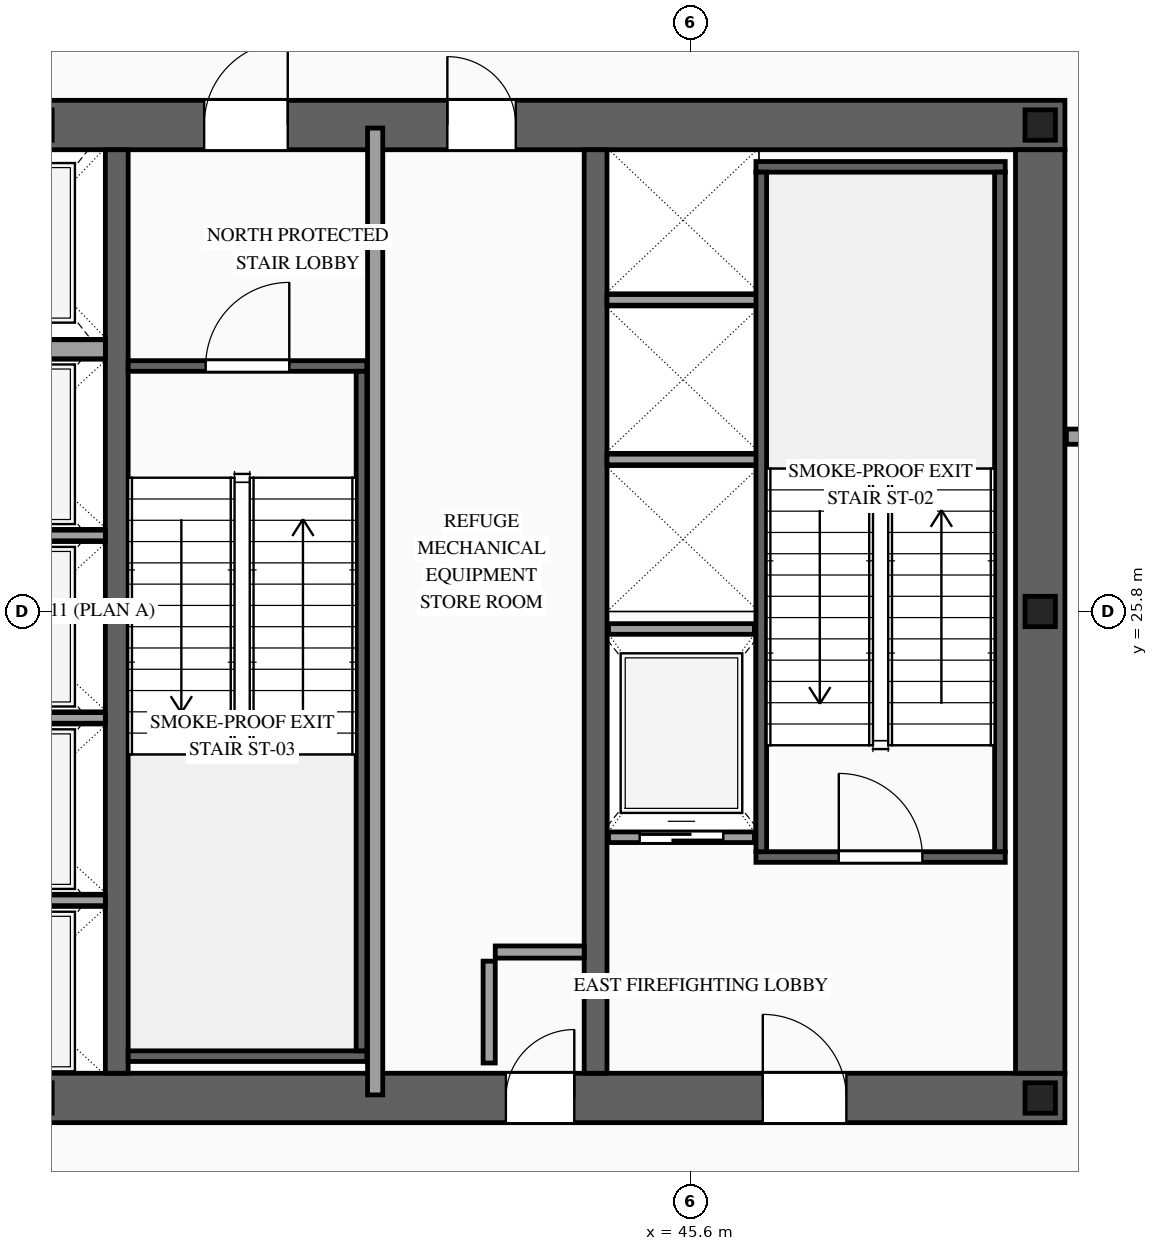
"""IFC4 building model, lengths in metres.
Left out: names, types, materials, properties, quantities, classifications, styles, units other than length and angle.
Written with IfcOpenShell. Run it as: python <this file> out.ifc"""

import sys

from ifc_helpers import new_model, si_unit, direction, frame, frame_2d, origin, origin_2d, place, context, subcontext, project, spatial, rectangle, i_section, extrude, source, transform, mapped, element, fill, save


model = new_model("IFC4")
c1 = context("Model", 3, precision=1e-05, world=origin(), true_north=direction((0.0, 1.0)))
c2 = subcontext(c1, "Body", "Model", "MODEL_VIEW")
j1 = project(units=[si_unit("LENGTHUNIT", "METRE"), si_unit("PLANEANGLEUNIT", "RADIAN")], contexts=[c1])
p1 = place(None, origin())
s1 = spatial("IfcSite", under=j1, at=p1, CompositionType="ELEMENT")
p2 = place(p1, origin())
s2 = spatial("IfcBuilding", under=s1, at=p2, CompositionType="ELEMENT")
p3 = place(p2, frame((0.0, 0.0, 176.4)))
s3 = spatial("IfcBuildingStorey", under=s2, at=p3, CompositionType="ELEMENT", Elevation=176.4)
p4 = place(p3, frame((23.475, 19.4, 0.0), z_axis=(0.0, 0.0, 1.0), x_axis=(1.0, 0.0, 0.0)))
e1 = element("IfcWall", 1, at=p4, inside=s3, PredefinedType="SHEAR", context=c2, shape_type="SweptSolid", body=[
    extrude(rectangle(XDim=27.05, YDim=0.65, at=frame_2d((13.525, 0.0))), origin(), (0.0, 0.0, 1.0), 4.6),
])
p5 = place(p4, frame((1.975, 0.0, 0.0)))
e2 = element("IfcOpeningElement", 2, at=p5, cuts=e1, PredefinedType="OPENING", context=c2, shape_type="SweptSolid", body=[
    extrude(rectangle(XDim=1.1, YDim=2.2, at=frame_2d((0.55, 1.1))), frame((0.0, 0.34, 0.0), z_axis=(0.0, -1.0, 0.0), x_axis=(1.0, 0.0, 0.0)), (0.0, 0.0, 1.0), 0.68),
])
p6 = place(p4, frame((9.875, 0.0, 0.0)))
e3 = element("IfcOpeningElement", 3, at=p6, cuts=e1, PredefinedType="OPENING", context=c2, shape_type="SweptSolid", body=[
    extrude(rectangle(XDim=1.1, YDim=2.2, at=frame_2d((0.55, 1.1))), frame((0.0, 0.34, 0.0), z_axis=(0.0, -1.0, 0.0), x_axis=(1.0, 0.0, 0.0)), (0.0, 0.0, 1.0), 0.68),
])
p7 = place(p4, frame((23.075, 0.0, 0.0)))
e4 = element("IfcOpeningElement", 4, at=p7, cuts=e1, PredefinedType="OPENING", context=c2, shape_type="SweptSolid", body=[
    extrude(rectangle(XDim=1.1, YDim=2.2, at=frame_2d((0.55, 1.1))), frame((0.0, 0.34, 0.0), z_axis=(0.0, -1.0, 0.0), x_axis=(1.0, 0.0, 0.0)), (0.0, 0.0, 1.0), 0.68),
])
p8 = place(p4, frame((19.695, 0.0, 0.0)))
e5 = element("IfcOpeningElement", 5, at=p8, cuts=e1, PredefinedType="OPENING", context=c2, shape_type="SweptSolid", body=[
    extrude(rectangle(XDim=0.9, YDim=2.15, at=frame_2d((0.45, 1.075))), frame((0.0, 0.34, 0.0), z_axis=(0.0, -1.0, 0.0), x_axis=(1.0, 0.0, 0.0)), (0.0, 0.0, 1.0), 0.68),
])
p9 = place(p3, frame((23.475, 32.2, 0.0), z_axis=(0.0, 0.0, 1.0), x_axis=(1.0, 0.0, 0.0)))
e6 = element("IfcWall", 6, at=p9, inside=s3, PredefinedType="SHEAR", context=c2, shape_type="SweptSolid", body=[
    extrude(rectangle(XDim=27.05, YDim=0.65, at=frame_2d((13.525, 0.0))), origin(), (0.0, 0.0, 1.0), 4.6),
])
p10 = place(p9, frame((4.595, 0.0, 0.0)))
e7 = element("IfcOpeningElement", 7, at=p10, cuts=e6, PredefinedType="OPENING", context=c2, shape_type="SweptSolid", body=[
    extrude(rectangle(XDim=0.9, YDim=2.15, at=frame_2d((0.45, 1.075))), frame((0.0, 0.34, 0.0), z_axis=(0.0, -1.0, 0.0), x_axis=(1.0, 0.0, 0.0)), (0.0, 0.0, 1.0), 0.68),
])
p11 = place(p9, frame((9.875, 0.0, 0.0)))
e8 = element("IfcOpeningElement", 8, at=p11, cuts=e6, PredefinedType="OPENING", context=c2, shape_type="SweptSolid", body=[
    extrude(rectangle(XDim=1.1, YDim=2.2, at=frame_2d((0.55, 1.1))), frame((0.0, 0.34, 0.0), z_axis=(0.0, -1.0, 0.0), x_axis=(1.0, 0.0, 0.0)), (0.0, 0.0, 1.0), 0.68),
])
p12 = place(p9, frame((15.725, 0.0, 0.0)))
e9 = element("IfcOpeningElement", 9, at=p12, cuts=e6, PredefinedType="OPENING", context=c2, shape_type="SweptSolid", body=[
    extrude(rectangle(XDim=1.1, YDim=2.2, at=frame_2d((0.55, 1.1))), frame((0.0, 0.34, 0.0), z_axis=(0.0, -1.0, 0.0), x_axis=(1.0, 0.0, 0.0)), (0.0, 0.0, 1.0), 0.68),
])
p13 = place(p9, frame((18.925, 0.0, 0.0)))
e10 = element("IfcOpeningElement", 10, at=p13, cuts=e6, PredefinedType="OPENING", context=c2, shape_type="SweptSolid", body=[
    extrude(rectangle(XDim=0.9, YDim=2.15, at=frame_2d((0.45, 1.075))), frame((0.0, 0.34, 0.0), z_axis=(0.0, -1.0, 0.0), x_axis=(1.0, 0.0, 0.0)), (0.0, 0.0, 1.0), 0.68),
])
m1 = source(origin(), c2, "Body", "SweptSolid", [
    extrude(rectangle(XDim=12.15, YDim=0.65, at=frame_2d((6.075, 0.0))), origin(), (0.0, 0.0, 1.0), 4.6),
])
p14 = place(p3, frame((50.2, 19.725, 0.0), z_axis=(0.0, 0.0, 1.0), x_axis=(0.0, 1.0, 0.0)))
e11 = element("IfcWall", 11, at=p14, inside=s3, PredefinedType="SHEAR", context=c2, shape_type="MappedRepresentation", body=[
    mapped(m1, transform((0.0, 0.0, 0.0), scale=1.0)),
])
m2 = source(origin(), c2, "Body", "SweptSolid", [
    extrude(rectangle(XDim=12.15, YDim=0.3, at=frame_2d((6.075, 0.0))), origin(), (0.0, 0.0, 1.0), 4.6),
])
for number, where, z_axis, x_axis in (
    (12, (38.05, 19.725, 0.0), (0.0, 0.0, 1.0), (0.0, 1.0, 0.0)),
    (13, (44.35, 19.725, 0.0), (0.0, 0.0, 1.0), (0.0, 1.0, 0.0)),
):
    element("IfcWall", number, at=place(p3, frame(where, z_axis=z_axis, x_axis=x_axis)), inside=s3, PredefinedType="SOLIDWALL", context=c2, shape_type="MappedRepresentation", body=[
        mapped(m2, transform((0.0, 0.0, 0.0), scale=1.0)),
    ])
m3 = source(origin(), c2, "Body", "SweptSolid", [
    extrude(i_section(OverallWidth=0.4, OverallDepth=0.4, WebThickness=0.013, FlangeThickness=0.021, at=origin_2d()), origin(), (0.0, 0.0, 1.0), 4.6),
])
for number, where, z_axis, x_axis in (
    (14, (50.2, 19.4, 0.0), (0.0, 0.0, 1.0), (1.0, 0.0, 0.0)),
    (15, (50.2, 25.8, 0.0), (0.0, 0.0, 1.0), (1.0, 0.0, 0.0)),
    (16, (50.2, 32.2, 0.0), (0.0, 0.0, 1.0), (1.0, 0.0, 0.0)),
):
    element("IfcColumn", number, at=place(p3, frame(where, z_axis=z_axis, x_axis=x_axis)), inside=s3, PredefinedType="COLUMN", context=c2, shape_type="MappedRepresentation", body=[
        mapped(m3, transform((0.0, 0.0, 0.0), scale=1.0)),
    ])
p15 = place(p3, frame((44.52, 22.83, 0.0), z_axis=(0.0, 0.0, 1.0), x_axis=(1.0, 0.0, 0.0)))
e17 = element("IfcWall", 17, at=p15, inside=s3, PredefinedType="SOLIDWALL", context=c2, shape_type="SweptSolid", body=[
    extrude(rectangle(XDim=1.92, YDim=0.14, at=frame_2d((0.96, 0.0))), origin(), (0.0, 0.0, 1.0), 4.38),
])
p16 = place(p15, frame((0.41, 0.0, 0.0)))
e18 = element("IfcOpeningElement", 18, at=p16, cuts=e17, PredefinedType="OPENING", context=c2, shape_type="SweptSolid", body=[
    extrude(rectangle(XDim=1.1, YDim=2.2, at=frame_2d((0.55, 1.1))), frame((0.0, 0.085, 0.0), z_axis=(0.0, -1.0, 0.0), x_axis=(1.0, 0.0, 0.0)), (0.0, 0.0, 1.0), 0.17),
])
m4 = source(origin(), c2, "Body", "SweptSolid", [
    extrude(rectangle(XDim=1.92, YDim=0.14, at=frame_2d((0.96, 0.0))), origin(), (0.0, 0.0, 1.0), 4.38),
])
p17 = place(p3, frame((44.52, 25.57, 0.0), z_axis=(0.0, 0.0, 1.0), x_axis=(1.0, 0.0, 0.0)))
e19 = element("IfcWall", 19, at=p17, inside=s3, PredefinedType="SOLIDWALL", context=c2, shape_type="MappedRepresentation", body=[
    mapped(m4, transform((0.0, 0.0, 0.0), scale=1.0)),
])
m5 = source(origin(), c2, "Body", "SweptSolid", [
    extrude(rectangle(XDim=2.4, YDim=0.14, at=frame_2d((1.2, 0.0))), origin(), (0.0, 0.0, 1.0), 4.38),
])
for number, where, z_axis, x_axis in (
    (20, (35.5, 22.0, 0.0), (0.0, 0.0, 1.0), (1.0, 0.0, 0.0)),
    (21, (35.5, 24.4, 0.0), (0.0, 0.0, 1.0), (1.0, 0.0, 0.0)),
    (22, (35.5, 26.8, 0.0), (0.0, 0.0, 1.0), (1.0, 0.0, 0.0)),
):
    element("IfcWall", number, at=place(p3, frame(where, z_axis=z_axis, x_axis=x_axis)), inside=s3, PredefinedType="SOLIDWALL", context=c2, shape_type="MappedRepresentation", body=[
        mapped(m5, transform((0.0, 0.0, 0.0), scale=1.0)),
    ])
m6 = source(origin(), c2, "Body", "SweptSolid", [
    extrude(rectangle(XDim=2.4, YDim=0.25, at=frame_2d((1.2, 0.0))), origin(), (0.0, 0.0, 1.0), 4.38),
])
p18 = place(p3, frame((35.5, 29.25, 0.0), z_axis=(0.0, 0.0, 1.0), x_axis=(1.0, 0.0, 0.0)))
e23 = element("IfcWall", 23, at=p18, inside=s3, PredefinedType="SOLIDWALL", context=c2, shape_type="MappedRepresentation", body=[
    mapped(m6, transform((0.0, 0.0, 0.0), scale=1.0)),
])
m7 = source(origin(), c2, "Body", "SweptSolid", [
    extrude(rectangle(XDim=2.0, YDim=0.14, at=frame_2d((1.0, 0.0))), origin(), (0.0, 0.0, 1.0), 4.38),
])
for number, where, z_axis, x_axis in (
    (24, (44.5, 27.8, 0.0), (0.0, 0.0, 1.0), (1.0, 0.0, 0.0)),
    (25, (44.5, 29.9, 0.0), (0.0, 0.0, 1.0), (1.0, 0.0, 0.0)),
):
    element("IfcWall", number, at=place(p3, frame(where, z_axis=z_axis, x_axis=x_axis)), inside=s3, PredefinedType="SOLIDWALL", context=c2, shape_type="MappedRepresentation", body=[
        mapped(m7, transform((0.0, 0.0, 0.0), scale=1.0)),
    ])
p19 = place(p3, frame((46.46, 22.57, 0.0), z_axis=(0.0, 0.0, 1.0), x_axis=(1.0, 0.0, 0.0)))
e26 = element("IfcWall", 26, at=p19, inside=s3, PredefinedType="SOLIDWALL", context=c2, shape_type="SweptSolid", body=[
    extrude(rectangle(XDim=3.28, YDim=0.14, at=frame_2d((1.64, 0.0))), origin(), (0.0, 0.0, 1.0), 4.38),
])
p20 = place(p19, frame((1.09, 0.0, 0.0)))
e27 = element("IfcOpeningElement", 27, at=p20, cuts=e26, PredefinedType="OPENING", context=c2, shape_type="SweptSolid", body=[
    extrude(rectangle(XDim=1.1, YDim=2.2, at=frame_2d((0.55, 1.1))), frame((0.0, 0.085, 0.0), z_axis=(0.0, -1.0, 0.0), x_axis=(1.0, 0.0, 0.0)), (0.0, 0.0, 1.0), 0.17),
])
m8 = source(origin(), c2, "Body", "SweptSolid", [
    extrude(rectangle(XDim=3.28, YDim=0.14, at=frame_2d((1.64, 0.0))), origin(), (0.0, 0.0, 1.0), 4.38),
])
p21 = place(p3, frame((46.46, 31.65, 0.0), z_axis=(0.0, 0.0, 1.0), x_axis=(1.0, 0.0, 0.0)))
e28 = element("IfcWall", 28, at=p21, inside=s3, PredefinedType="SOLIDWALL", context=c2, shape_type="MappedRepresentation", body=[
    mapped(m8, transform((0.0, 0.0, 0.0), scale=1.0)),
])
m9 = source(origin(), c2, "Body", "SweptSolid", [
    extrude(rectangle(XDim=8.94, YDim=0.14, at=frame_2d((4.47, 0.0))), origin(), (0.0, 0.0, 1.0), 4.38),
])
for number, where, z_axis, x_axis in (
    (29, (46.53, 22.64, 0.0), (0.0, 0.0, 1.0), (0.0, 1.0, 0.0)),
    (30, (49.67, 22.64, 0.0), (0.0, 0.0, 1.0), (0.0, 1.0, 0.0)),
):
    element("IfcWall", number, at=place(p3, frame(where, z_axis=z_axis, x_axis=x_axis)), inside=s3, PredefinedType="SOLIDWALL", context=c2, shape_type="MappedRepresentation", body=[
        mapped(m9, transform((0.0, 0.0, 0.0), scale=1.0)),
    ])
p22 = place(p3, frame((38.2, 29.03, 0.0), z_axis=(0.0, 0.0, 1.0), x_axis=(1.0, 0.0, 0.0)))
e31 = element("IfcWall", 31, at=p22, inside=s3, PredefinedType="SOLIDWALL", context=c2, shape_type="SweptSolid", body=[
    extrude(rectangle(XDim=3.14, YDim=0.14, at=frame_2d((1.57, 0.0))), origin(), (0.0, 0.0, 1.0), 4.38),
])
p23 = place(p22, frame((1.02, 0.0, 0.0)))
e32 = element("IfcOpeningElement", 32, at=p23, cuts=e31, PredefinedType="OPENING", context=c2, shape_type="SweptSolid", body=[
    extrude(rectangle(XDim=1.1, YDim=2.2, at=frame_2d((0.55, 1.1))), frame((0.0, 0.085, 0.0), z_axis=(0.0, -1.0, 0.0), x_axis=(1.0, 0.0, 0.0)), (0.0, 0.0, 1.0), 0.17),
])
m10 = source(origin(), c2, "Body", "SweptSolid", [
    extrude(rectangle(XDim=3.14, YDim=0.14, at=frame_2d((1.57, 0.0))), origin(), (0.0, 0.0, 1.0), 4.38),
])
p24 = place(p3, frame((38.2, 19.95, 0.0), z_axis=(0.0, 0.0, 1.0), x_axis=(1.0, 0.0, 0.0)))
e33 = element("IfcWall", 33, at=p24, inside=s3, PredefinedType="SOLIDWALL", context=c2, shape_type="MappedRepresentation", body=[
    mapped(m10, transform((0.0, 0.0, 0.0), scale=1.0)),
])
m11 = source(origin(), c2, "Body", "SweptSolid", [
    extrude(rectangle(XDim=8.94, YDim=0.14, at=frame_2d((4.47, 0.0))), origin(), (0.0, 0.0, 1.0), 4.38),
])
p25 = place(p3, frame((41.27, 20.02, 0.0), z_axis=(0.0, 0.0, 1.0), x_axis=(0.0, 1.0, 0.0)))
e34 = element("IfcWall", 34, at=p25, inside=s3, PredefinedType="SOLIDWALL", context=c2, shape_type="MappedRepresentation", body=[
    mapped(m11, transform((0.0, 0.0, 0.0), scale=1.0)),
])
m12 = source(origin(), c2, "Body", "SweptSolid", [
    extrude(rectangle(XDim=1.34, YDim=0.16, at=frame_2d((0.67, 0.0))), origin(), (0.0, 0.0, 1.0), 4.38),
])
p26 = place(p3, frame((42.95, 19.86, 0.0), z_axis=(0.0, 0.0, 1.0), x_axis=(0.0, 1.0, 0.0)))
e35 = element("IfcWall", 35, at=p26, inside=s3, PredefinedType="PARTITIONING", context=c2, shape_type="MappedRepresentation", body=[
    mapped(m12, transform((0.0, 0.0, 0.0), scale=1.0)),
])
m13 = source(origin(), c2, "Body", "SweptSolid", [
    extrude(rectangle(XDim=1.17, YDim=0.16, at=frame_2d((0.585, 0.0))), origin(), (0.0, 0.0, 1.0), 4.38),
])
p27 = place(p3, frame((43.03, 21.32, 0.0), z_axis=(0.0, 0.0, 1.0), x_axis=(1.0, 0.0, 0.0)))
e36 = element("IfcWall", 36, at=p27, inside=s3, PredefinedType="PARTITIONING", context=c2, shape_type="MappedRepresentation", body=[
    mapped(m13, transform((0.0, 0.0, 0.0), scale=1.0)),
])
m14 = source(origin(), c2, "Body", "SweptSolid", [
    extrude(rectangle(XDim=12.72, YDim=0.2, at=frame_2d((6.36, 0.0))), origin(), (0.0, 0.0, 1.0), 4.38),
])
p28 = place(p3, frame((41.45, 19.44, 0.0), z_axis=(0.0, 0.0, 1.0), x_axis=(0.0, 1.0, 0.0)))
e37 = element("IfcWall", 37, at=p28, inside=s3, PredefinedType="PARTITIONING", context=c2, shape_type="MappedRepresentation", body=[
    mapped(m14, transform((0.0, 0.0, 0.0), scale=1.0)),
])
m15 = source(origin(), c2, "Body", "SweptSolid", [
    extrude(rectangle(XDim=1.505, YDim=0.2, at=frame_2d((0.752, 0.0))), origin(), (0.0, 0.0, 1.0), 4.38),
])
p29 = place(p3, frame((50.545, 28.1, 0.0), z_axis=(0.0, 0.0, 1.0), x_axis=(1.0, 0.0, 0.0)))
e38 = element("IfcWall", 38, at=p29, inside=s3, PredefinedType="PARTITIONING", context=c2, shape_type="MappedRepresentation", body=[
    mapped(m15, transform((0.0, 0.0, 0.0), scale=1.0)),
])
m16 = source(origin(), c2, "Body", "SweptSolid", [
    extrude(rectangle(XDim=1.1, YDim=2.2, at=frame_2d((0.55, 1.1))), frame((0.0, 0.025, 0.0), z_axis=(0.0, -1.0, 0.0), x_axis=(1.0, 0.0, 0.0)), (0.0, 0.0, 1.0), 0.05),
])
p30 = place(p16, origin())
e39 = element("IfcDoor", 39, at=p30, inside=s3, OperationType="SLIDING_TO_RIGHT", PredefinedType="DOOR", context=c2, shape_type="MappedRepresentation", body=[
    mapped(m16, transform((0.0, 0.0, 0.0), scale=1.0)),
])
fill(e18, e39)
m17 = source(origin(), c2, "Body", "SweptSolid", [
    extrude(rectangle(XDim=1.1, YDim=2.2, at=frame_2d((0.55, 1.1))), frame((0.0, 0.025, 0.0), z_axis=(0.0, -1.0, 0.0), x_axis=(1.0, 0.0, 0.0)), (0.0, 0.0, 1.0), 0.05),
])
p31 = place(p20, origin())
e40 = element("IfcDoor", 40, at=p31, inside=s3, OperationType="SINGLE_SWING_LEFT", PredefinedType="DOOR", context=c2, shape_type="MappedRepresentation", body=[
    mapped(m17, transform((0.0, 0.0, 0.0), scale=1.0)),
])
fill(e27, e40)
p32 = place(p23, origin())
e41 = element("IfcDoor", 41, at=p32, inside=s3, OperationType="SINGLE_SWING_RIGHT", PredefinedType="DOOR", context=c2, shape_type="MappedRepresentation", body=[
    mapped(m17, transform((0.0, 0.0, 0.0), scale=1.0)),
])
fill(e32, e41)
p33 = place(p7, origin())
e42 = element("IfcDoor", 42, at=p33, inside=s3, OperationType="SINGLE_SWING_LEFT", PredefinedType="DOOR", context=c2, shape_type="MappedRepresentation", body=[
    mapped(m17, transform((0.0, 0.0, 0.0), scale=1.0)),
])
fill(e4, e42)
p34 = place(p12, origin())
e43 = element("IfcDoor", 43, at=p34, inside=s3, OperationType="SINGLE_SWING_RIGHT", PredefinedType="DOOR", context=c2, shape_type="MappedRepresentation", body=[
    mapped(m17, transform((0.0, 0.0, 0.0), scale=1.0)),
])
fill(e9, e43)
m18 = source(origin(), c2, "Body", "SweptSolid", [
    extrude(rectangle(XDim=0.9, YDim=2.15, at=frame_2d((0.45, 1.075))), frame((0.0, 0.025, 0.0), z_axis=(0.0, -1.0, 0.0), x_axis=(1.0, 0.0, 0.0)), (0.0, 0.0, 1.0), 0.05),
])
p35 = place(p8, origin())
e44 = element("IfcDoor", 44, at=p35, inside=s3, OperationType="SINGLE_SWING_RIGHT", PredefinedType="DOOR", context=c2, shape_type="MappedRepresentation", body=[
    mapped(m18, transform((0.0, 0.0, 0.0), scale=1.0)),
])
fill(e5, e44)
p36 = place(p13, origin())
e45 = element("IfcDoor", 45, at=p36, inside=s3, OperationType="SINGLE_SWING_LEFT", PredefinedType="DOOR", context=c2, shape_type="MappedRepresentation", body=[
    mapped(m18, transform((0.0, 0.0, 0.0), scale=1.0)),
])
fill(e10, e45)
save(model, sys.argv[1])
